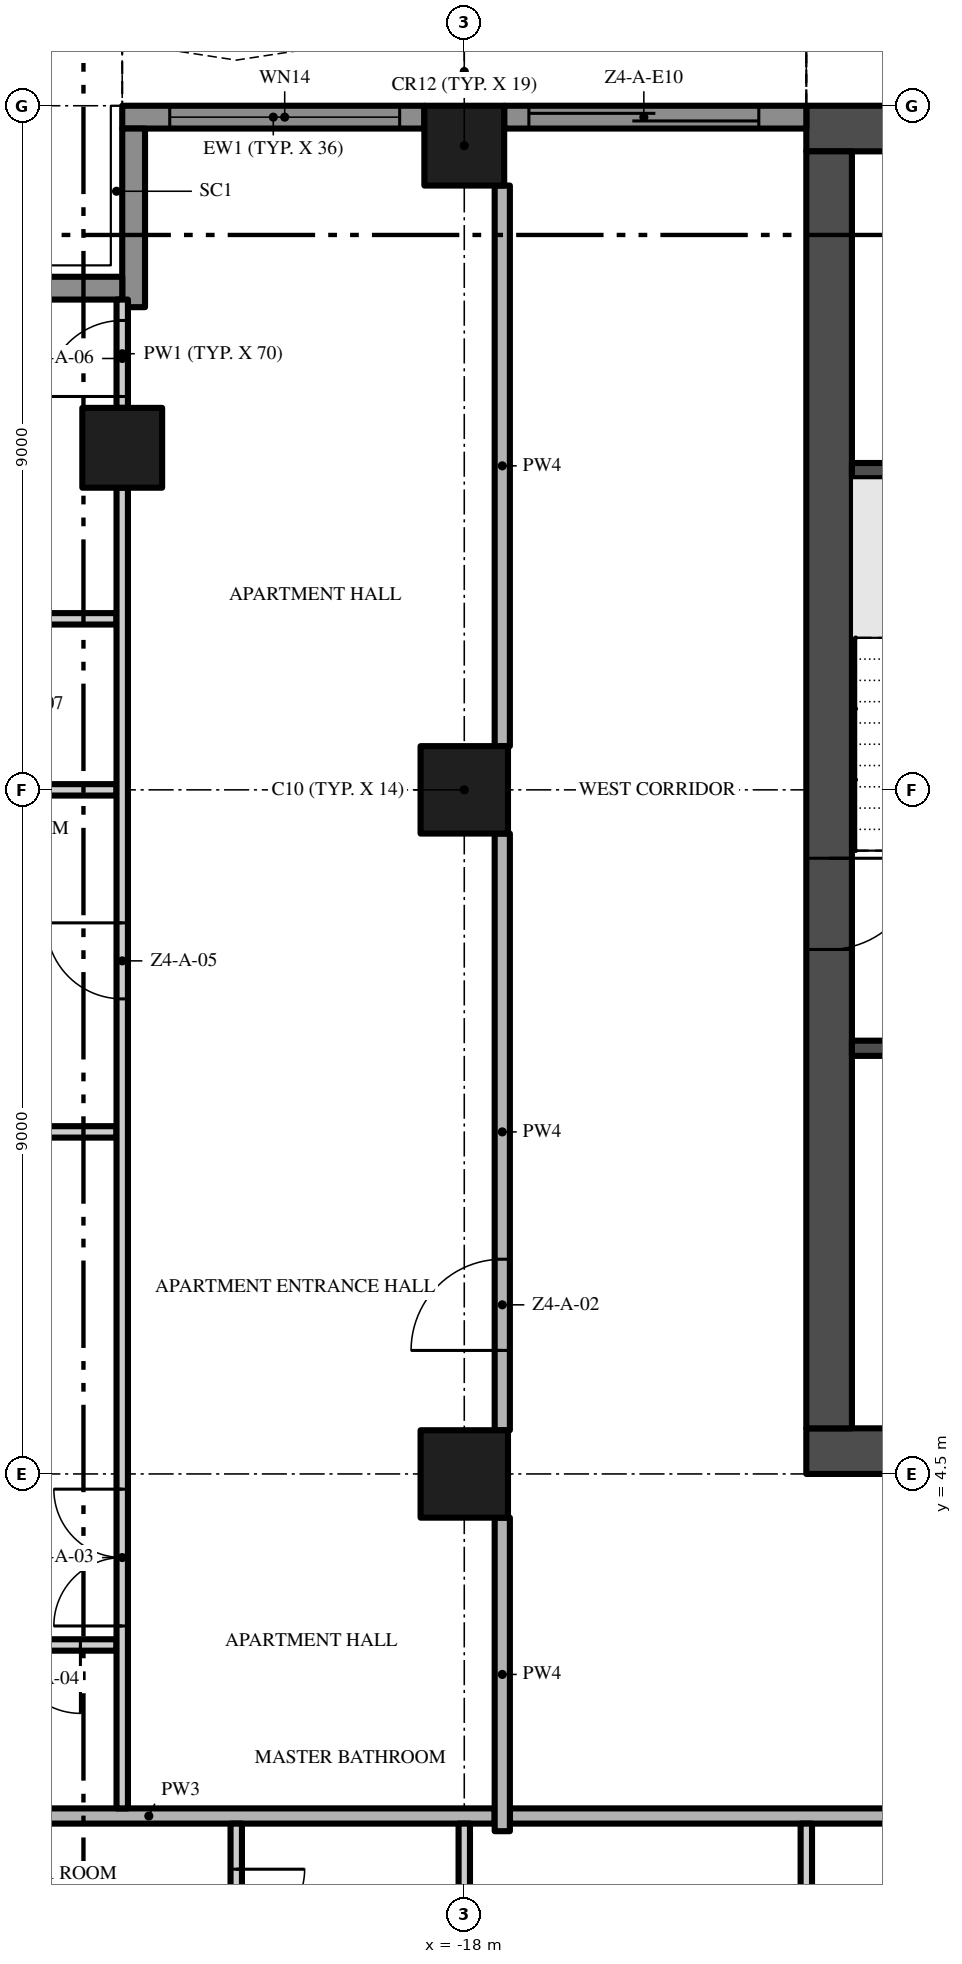
"""IFC4 building model, lengths in metres.
Left out: names, types, materials, properties, quantities, classifications, styles, units other than length and angle.
Written with IfcOpenShell. Run it as: python <this file> out.ifc"""

import sys

from ifc_helpers import new_model, si_unit, direction, frame, frame_2d, origin, origin_2d, place, context, subcontext, project, spatial, polyline, rectangle, outline, extrude, element, fill, save


model = new_model("IFC4")
c1 = context("Model", 3, precision=1e-05, world=origin(), true_north=direction((0.0, 1.0)))
c2 = subcontext(c1, "Body", "Model", "MODEL_VIEW")
j1 = project(units=[si_unit("LENGTHUNIT", "METRE"), si_unit("PLANEANGLEUNIT", "RADIAN")], contexts=[c1])
p1 = place(None, origin())
s1 = spatial("IfcSite", under=j1, at=p1, CompositionType="ELEMENT")
p2 = place(p1, origin())
s2 = spatial("IfcBuilding", under=s1, at=p2, CompositionType="ELEMENT")
p3 = place(p2, frame((0.0, 0.0, 188.2)))
s3 = spatial("IfcBuildingStorey", under=s2, at=p3, CompositionType="ELEMENT", Elevation=188.2)
p4 = place(p3, frame((-13.5, 4.8, -0.3), z_axis=(0.0, 0.0, 1.0), x_axis=(1.0, 0.0, 0.0)))
e1 = element("IfcWall", 1, at=p4, inside=s3, PredefinedType="SHEAR", context=c2, shape_type="SweptSolid", body=[
    extrude(rectangle(XDim=27.0, YDim=0.6, at=frame_2d((13.5, 0.0))), origin(), (0.0, 0.0, 1.0), 3.8),
])
p5 = place(p4, frame((12.0, 0.0, 0.3)))
e2 = element("IfcOpeningElement", 2, at=p5, cuts=e1, PredefinedType="OPENING", context=c2, shape_type="SweptSolid", body=[
    extrude(rectangle(XDim=3.0, YDim=2.4, at=frame_2d((1.5, 1.2))), frame((0.0, 0.31, 0.0), z_axis=(0.0, -1.0, 0.0), x_axis=(1.0, 0.0, 0.0)), (0.0, 0.0, 1.0), 0.62),
])
p6 = place(p4, frame((4.9, 0.0, 0.3)))
e3 = element("IfcOpeningElement", 3, at=p6, cuts=e1, PredefinedType="OPENING", context=c2, shape_type="SweptSolid", body=[
    extrude(rectangle(XDim=1.2, YDim=2.2, at=frame_2d((0.6, 1.1))), frame((0.0, 0.31, 0.0), z_axis=(0.0, -1.0, 0.0), x_axis=(1.0, 0.0, 0.0)), (0.0, 0.0, 1.0), 0.62),
])
p7 = place(p4, frame((20.75, 0.0, 0.3)))
e4 = element("IfcOpeningElement", 4, at=p7, cuts=e1, PredefinedType="OPENING", context=c2, shape_type="SweptSolid", body=[
    extrude(rectangle(XDim=1.5, YDim=2.2, at=frame_2d((0.75, 1.1))), frame((0.0, 0.31, 0.0), z_axis=(0.0, -1.0, 0.0), x_axis=(1.0, 0.0, 0.0)), (0.0, 0.0, 1.0), 0.62),
])
p8 = place(p4, frame((17.4, 0.0, 0.3)))
e5 = element("IfcOpeningElement", 5, at=p8, cuts=e1, PredefinedType="OPENING", context=c2, shape_type="SweptSolid", body=[
    extrude(rectangle(XDim=1.2, YDim=2.2, at=frame_2d((0.6, 1.1))), frame((0.0, 0.31, 0.0), z_axis=(0.0, -1.0, 0.0), x_axis=(1.0, 0.0, 0.0)), (0.0, 0.0, 1.0), 0.62),
])
p9 = place(p3, frame((13.5, 22.2, -0.3), z_axis=(0.0, 0.0, 1.0), x_axis=(-1.0, 0.0, 0.0)))
e6 = element("IfcWall", 6, at=p9, inside=s3, PredefinedType="SHEAR", context=c2, shape_type="SweptSolid", body=[
    extrude(rectangle(XDim=27.0, YDim=0.6, at=frame_2d((13.5, 0.0))), origin(), (0.0, 0.0, 1.0), 3.8),
])
p10 = place(p3, frame((-13.2, 21.9, -0.3), z_axis=(0.0, 0.0, 1.0), x_axis=(0.0, -1.0, 0.0)))
e7 = element("IfcWall", 7, at=p10, inside=s3, PredefinedType="SHEAR", context=c2, shape_type="SweptSolid", body=[
    extrude(rectangle(XDim=16.8, YDim=0.6, at=frame_2d((8.4, 0.0))), origin(), (0.0, 0.0, 1.0), 3.8),
])
p11 = place(p10, frame((9.3, 0.0, 0.3)))
e8 = element("IfcOpeningElement", 8, at=p11, cuts=e7, PredefinedType="OPENING", context=c2, shape_type="SweptSolid", body=[
    extrude(rectangle(XDim=1.2, YDim=2.2, at=frame_2d((0.6, 1.1))), frame((0.0, 0.31, 0.0), z_axis=(0.0, -1.0, 0.0), x_axis=(1.0, 0.0, 0.0)), (0.0, 0.0, 1.0), 0.62),
])
p12 = place(p3, frame((-18.0, 13.5, 0.0), z_axis=(0.0, 0.0, 1.0), x_axis=(1.0, 0.0, 0.0)))
e9 = element("IfcColumn", 9, at=p12, inside=s3, PredefinedType="COLUMN", context=c2, shape_type="SweptSolid", body=[
    extrude(rectangle(XDim=1.15, YDim=1.15, at=origin_2d()), origin(), (0.0, 0.0, 1.0), 3.5),
])
p13 = place(p3, frame((-18.0, 21.975, 0.0), z_axis=(0.0, 0.0, 1.0), x_axis=(1.0, 0.0, 0.0)))
e10 = element("IfcColumn", 10, at=p13, inside=s3, PredefinedType="COLUMN", context=c2, shape_type="SweptSolid", body=[
    extrude(rectangle(XDim=1.05, YDim=1.05, at=origin_2d()), origin(), (0.0, 0.0, 1.0), 3.5),
])
p14 = place(p3, frame((-18.0, 4.5, 0.0), z_axis=(0.0, 0.0, 1.0), x_axis=(1.0, 0.0, 0.0)))
e11 = element("IfcColumn", 11, at=p14, inside=s3, PredefinedType="COLUMN", context=c2, shape_type="SweptSolid", body=[
    extrude(rectangle(XDim=1.15, YDim=1.15, at=origin_2d()), origin(), (0.0, 0.0, 1.0), 3.5),
])
p15 = place(p3, frame((-22.5, 18.0, 0.0), z_axis=(0.0, 0.0, 1.0), x_axis=(1.0, 0.0, 0.0)))
e12 = element("IfcColumn", 12, at=p15, inside=s3, PredefinedType="COLUMN", context=c2, shape_type="SweptSolid", body=[
    extrude(rectangle(XDim=1.05, YDim=1.05, at=origin_2d()), origin(), (0.0, 0.0, 1.0), 3.5),
])
p16 = place(p3, frame((-17.475, 22.35, 0.0), z_axis=(0.0, 0.0, 1.0), x_axis=(1.0, 0.0, 0.0)))
e13 = element("IfcWall", 13, at=p16, inside=s3, PredefinedType="SOLIDWALL", context=c2, shape_type="SweptSolid", body=[
    extrude(rectangle(XDim=3.975, YDim=0.3, at=frame_2d((1.988, 0.0))), origin(), (0.0, 0.0, 1.0), 3.5),
])
p17 = place(p16, frame((0.325, 0.0, 0.0)))
e14 = element("IfcOpeningElement", 14, at=p17, cuts=e13, PredefinedType="OPENING", context=c2, shape_type="SweptSolid", body=[
    extrude(rectangle(XDim=3.025, YDim=2.4, at=frame_2d((1.512, 1.2))), frame((0.0, 0.16, 0.0), z_axis=(0.0, -1.0, 0.0), x_axis=(1.0, 0.0, 0.0)), (0.0, 0.0, 1.0), 0.32),
])
p18 = place(p3, frame((-22.5, 22.35, 0.0), z_axis=(0.0, 0.0, 1.0), x_axis=(1.0, 0.0, 0.0)))
e15 = element("IfcWall", 15, at=p18, inside=s3, PredefinedType="SOLIDWALL", context=c2, shape_type="SweptSolid", body=[
    extrude(rectangle(XDim=3.975, YDim=0.3, at=frame_2d((1.988, 0.0))), origin(), (0.0, 0.0, 1.0), 3.5),
])
p19 = place(p18, frame((0.625, 0.0, 0.45)))
e16 = element("IfcOpeningElement", 16, at=p19, cuts=e15, PredefinedType="OPENING", context=c2, shape_type="SweptSolid", body=[
    extrude(rectangle(XDim=3.025, YDim=2.65, at=frame_2d((1.512, 1.325))), frame((0.0, 0.16, 0.0), z_axis=(0.0, -1.0, 0.0), x_axis=(1.0, 0.0, 0.0)), (0.0, 0.0, 1.0), 0.32),
])
p20 = place(p3, frame((-22.35, 19.85, 0.0), z_axis=(0.0, 0.0, 1.0), x_axis=(0.0, 1.0, 0.0)))
e17 = element("IfcWall", 17, at=p20, inside=s3, PredefinedType="SOLIDWALL", context=c2, shape_type="SweptSolid", body=[
    extrude(rectangle(XDim=2.35, YDim=0.3, at=frame_2d((1.175, 0.0))), origin(), (0.0, 0.0, 1.0), 3.5),
])
p21 = place(p3, frame((-24.75, 20.1, 0.0), z_axis=(0.0, 0.0, 1.0), x_axis=(1.0, 0.0, 0.0)))
e18 = element("IfcWall", 18, at=p21, inside=s3, PredefinedType="SOLIDWALL", context=c2, shape_type="SweptSolid", body=[
    extrude(rectangle(XDim=2.25, YDim=0.3, at=frame_2d((1.125, 0.0))), origin(), (0.0, 0.0, 1.0), 3.5),
])
p22 = place(p3, origin())
e19 = element("IfcWall", 19, at=p22, inside=s3, PredefinedType="USERDEFINED", context=c2, shape_type="SweptSolid", body=[
    extrude(outline(polyline([(-13.5, 25.5), (-15.0, 25.271), (-16.5, 24.671), (-18.0, 23.929), (-19.5, 23.329), (-21.0, 23.1), (-22.5, 23.329), (-22.538, 23.082), (-21.0, 22.847), (-19.434, 23.086), (-17.898, 23.701), (-16.398, 24.442), (-14.934, 25.028), (-13.462, 25.253), (-13.5, 25.5)])), origin(), (0.0, 0.0, 1.0), 0.9),
])
for number, where, z_axis, x_axis in (
    (20, (-12.9, 10.1, 0.0), (0.0, 0.0, 1.0), (1.0, 0.0, 0.0)),
    (21, (-12.9, 17.7, 0.0), (0.0, 0.0, 1.0), (1.0, 0.0, 0.0)),
):
    element("IfcWall", number, at=place(p3, frame(where, z_axis=z_axis, x_axis=x_axis)), inside=s3, PredefinedType="SHEAR", context=c2, shape_type="SweptSolid", body=[
        extrude(rectangle(XDim=3.25, YDim=0.2, at=frame_2d((1.625, 0.0))), origin(), (0.0, 0.0, 1.0), 3.5),
    ])
p23 = place(p3, frame((-17.4, 0.0, 0.0), z_axis=(0.0, 0.0, 1.0), x_axis=(1.0, 0.0, 0.0)))
e22 = element("IfcWall", 22, at=p23, inside=s3, PredefinedType="PARTITIONING", context=c2, shape_type="SweptSolid", body=[
    extrude(rectangle(XDim=12.8, YDim=0.2, at=frame_2d((6.4, 0.0))), origin(), (0.0, 0.0, 1.0), 3.5),
])
p24 = place(p3, frame((-26.7, 0.0, 0.0), z_axis=(0.0, 0.0, 1.0), x_axis=(1.0, 0.0, 0.0)))
e23 = element("IfcWall", 23, at=p24, inside=s3, PredefinedType="PARTITIONING", context=c2, shape_type="SweptSolid", body=[
    extrude(rectangle(XDim=9.1, YDim=0.2, at=frame_2d((4.55, 0.0))), origin(), (0.0, 0.0, 1.0), 3.5),
])
p25 = place(p3, frame((-22.575, 2.25, 0.0), z_axis=(0.0, 0.0, 1.0), x_axis=(-1.0, 0.0, 0.0)))
e24 = element("IfcWall", 24, at=p25, inside=s3, PredefinedType="PARTITIONING", context=c2, shape_type="SweptSolid", body=[
    extrude(rectangle(XDim=1.875, YDim=0.15, at=frame_2d((0.938, 0.0))), origin(), (0.0, 0.0, 1.0), 3.5),
])
p26 = place(p25, frame((0.475, 0.0, 0.0)))
e25 = element("IfcOpeningElement", 25, at=p26, cuts=e24, PredefinedType="OPENING", context=c2, shape_type="SweptSolid", body=[
    extrude(rectangle(XDim=0.9, YDim=2.1, at=frame_2d((0.45, 1.05))), frame((0.0, 0.085, 0.0), z_axis=(0.0, -1.0, 0.0), x_axis=(1.0, 0.0, 0.0)), (0.0, 0.0, 1.0), 0.17),
])
p27 = place(p3, frame((-26.7, 9.0, 0.0), z_axis=(0.0, 0.0, 1.0), x_axis=(1.0, 0.0, 0.0)))
e26 = element("IfcWall", 26, at=p27, inside=s3, PredefinedType="PARTITIONING", context=c2, shape_type="SweptSolid", body=[
    extrude(rectangle(XDim=4.125, YDim=0.15, at=frame_2d((2.062, 0.0))), origin(), (0.0, 0.0, 1.0), 3.5),
])
p28 = place(p3, frame((-25.95, 13.5, 0.0), z_axis=(0.0, 0.0, 1.0), x_axis=(1.0, 0.0, 0.0)))
e27 = element("IfcWall", 27, at=p28, inside=s3, PredefinedType="PARTITIONING", context=c2, shape_type="SweptSolid", body=[
    extrude(rectangle(XDim=3.375, YDim=0.15, at=frame_2d((1.688, 0.0))), origin(), (0.0, 0.0, 1.0), 3.5),
])
p29 = place(p3, frame((-24.45, 15.75, 0.0), z_axis=(0.0, 0.0, 1.0), x_axis=(1.0, 0.0, 0.0)))
e28 = element("IfcWall", 28, at=p29, inside=s3, PredefinedType="PARTITIONING", context=c2, shape_type="SweptSolid", body=[
    extrude(rectangle(XDim=1.875, YDim=0.15, at=frame_2d((0.938, 0.0))), origin(), (0.0, 0.0, 1.0), 3.5),
])
p30 = place(p3, frame((-22.5, 0.1, 0.0), z_axis=(0.0, 0.0, 1.0), x_axis=(0.0, 1.0, 0.0)))
e29 = element("IfcWall", 29, at=p30, inside=s3, PredefinedType="PARTITIONING", context=c2, shape_type="SweptSolid", body=[
    extrude(rectangle(XDim=17.375, YDim=0.15, at=frame_2d((8.688, 0.0))), origin(), (0.0, 0.0, 1.0), 3.5),
])
p31 = place(p30, frame((2.4, 0.0, 0.0)))
e30 = element("IfcOpeningElement", 30, at=p31, cuts=e29, PredefinedType="OPENING", context=c2, shape_type="SweptSolid", body=[
    extrude(rectangle(XDim=1.8, YDim=2.4, at=frame_2d((0.9, 1.2))), frame((0.0, 0.085, 0.0), z_axis=(0.0, -1.0, 0.0), x_axis=(1.0, 0.0, 0.0)), (0.0, 0.0, 1.0), 0.17),
])
p32 = place(p30, frame((10.65, 0.0, 0.0)))
e31 = element("IfcOpeningElement", 31, at=p32, cuts=e29, PredefinedType="OPENING", context=c2, shape_type="SweptSolid", body=[
    extrude(rectangle(XDim=1.0, YDim=2.4, at=frame_2d((0.5, 1.2))), frame((0.0, 0.085, 0.0), z_axis=(0.0, -1.0, 0.0), x_axis=(1.0, 0.0, 0.0)), (0.0, 0.0, 1.0), 0.17),
])
p33 = place(p3, frame((-22.5, 18.525, 0.0), z_axis=(0.0, 0.0, 1.0), x_axis=(0.0, 1.0, 0.0)))
e32 = element("IfcWall", 32, at=p33, inside=s3, PredefinedType="PARTITIONING", context=c2, shape_type="SweptSolid", body=[
    extrude(rectangle(XDim=1.425, YDim=0.15, at=frame_2d((0.713, 0.0))), origin(), (0.0, 0.0, 1.0), 3.5),
])
p34 = place(p33, frame((0.15, 0.0, 0.0)))
e33 = element("IfcOpeningElement", 33, at=p34, cuts=e32, PredefinedType="OPENING", context=c2, shape_type="SweptSolid", body=[
    extrude(rectangle(XDim=1.0, YDim=2.4, at=frame_2d((0.5, 1.2))), frame((0.0, 0.085, 0.0), z_axis=(0.0, -1.0, 0.0), x_axis=(1.0, 0.0, 0.0)), (0.0, 0.0, 1.0), 0.17),
])
p35 = place(p3, frame((-21.0, -0.1, 0.0), z_axis=(0.0, 0.0, 1.0), x_axis=(0.0, -1.0, 0.0)))
e34 = element("IfcWall", 34, at=p35, inside=s3, PredefinedType="PARTITIONING", context=c2, shape_type="SweptSolid", body=[
    extrude(rectangle(XDim=2.225, YDim=0.15, at=frame_2d((1.113, 0.0))), origin(), (0.0, 0.0, 1.0), 3.5),
])
p36 = place(p35, frame((0.6, 0.0, 0.0)))
e35 = element("IfcOpeningElement", 35, at=p36, cuts=e34, PredefinedType="OPENING", context=c2, shape_type="SweptSolid", body=[
    extrude(rectangle(XDim=0.9, YDim=2.1, at=frame_2d((0.45, 1.05))), frame((0.0, 0.085, 0.0), z_axis=(0.0, -1.0, 0.0), x_axis=(1.0, 0.0, 0.0)), (0.0, 0.0, 1.0), 0.17),
])
p37 = place(p3, frame((-18.0, -3.925, 0.0), z_axis=(0.0, 0.0, 1.0), x_axis=(0.0, 1.0, 0.0)))
e36 = element("IfcWall", 36, at=p37, inside=s3, PredefinedType="PARTITIONING", context=c2, shape_type="SweptSolid", body=[
    extrude(rectangle(XDim=3.825, YDim=0.15, at=frame_2d((1.913, 0.0))), origin(), (0.0, 0.0, 1.0), 3.5),
])
p38 = place(p37, frame((0.15, 0.0, 0.0)))
e37 = element("IfcOpeningElement", 37, at=p38, cuts=e36, PredefinedType="OPENING", context=c2, shape_type="SweptSolid", body=[
    extrude(rectangle(XDim=1.0, YDim=2.4, at=frame_2d((0.5, 1.2))), frame((0.0, 0.085, 0.0), z_axis=(0.0, -1.0, 0.0), x_axis=(1.0, 0.0, 0.0)), (0.0, 0.0, 1.0), 0.17),
])
p39 = place(p3, frame((-17.5, -0.2, 0.0), z_axis=(0.0, 0.0, 1.0), x_axis=(0.0, 1.0, 0.0)))
e38 = element("IfcWall", 38, at=p39, inside=s3, PredefinedType="PARTITIONING", context=c2, shape_type="SweptSolid", body=[
    extrude(rectangle(XDim=4.125, YDim=0.2, at=frame_2d((2.062, 0.0))), origin(), (0.0, 0.0, 1.0), 3.5),
])
p40 = place(p3, frame((-17.5, 5.075, 0.0), z_axis=(0.0, 0.0, 1.0), x_axis=(0.0, 1.0, 0.0)))
e39 = element("IfcWall", 39, at=p40, inside=s3, PredefinedType="PARTITIONING", context=c2, shape_type="SweptSolid", body=[
    extrude(rectangle(XDim=7.85, YDim=0.2, at=frame_2d((3.925, 0.0))), origin(), (0.0, 0.0, 1.0), 3.5),
])
p41 = place(p40, frame((1.05, 0.0, 0.0)))
e40 = element("IfcOpeningElement", 40, at=p41, cuts=e39, PredefinedType="OPENING", context=c2, shape_type="SweptSolid", body=[
    extrude(rectangle(XDim=1.2, YDim=2.4, at=frame_2d((0.6, 1.2))), frame((0.0, 0.11, 0.0), z_axis=(0.0, -1.0, 0.0), x_axis=(1.0, 0.0, 0.0)), (0.0, 0.0, 1.0), 0.22),
])
p42 = place(p3, frame((-17.5, 14.075, 0.0), z_axis=(0.0, 0.0, 1.0), x_axis=(0.0, 1.0, 0.0)))
e41 = element("IfcWall", 41, at=p42, inside=s3, PredefinedType="PARTITIONING", context=c2, shape_type="SweptSolid", body=[
    extrude(rectangle(XDim=7.375, YDim=0.2, at=frame_2d((3.688, 0.0))), origin(), (0.0, 0.0, 1.0), 3.5),
])
p43 = place(p3, frame((-13.5, -11.325, 0.0), z_axis=(0.0, 0.0, 1.0), x_axis=(0.0, 1.0, 0.0)))
e42 = element("IfcWall", 42, at=p43, inside=s3, PredefinedType="PARTITIONING", context=c2, shape_type="SweptSolid", body=[
    extrude(rectangle(XDim=11.225, YDim=0.15, at=frame_2d((5.612, 0.0))), origin(), (0.0, 0.0, 1.0), 3.5),
])
p44 = place(p17, origin())
e43 = element("IfcDoor", 43, at=p44, inside=s3, OperationType="SINGLE_SWING_LEFT", PredefinedType="DOOR", context=c2, shape_type="SweptSolid", body=[
    extrude(rectangle(XDim=3.025, YDim=2.4, at=frame_2d((1.512, 1.2))), frame((0.0, 0.025, 0.0), z_axis=(0.0, -1.0, 0.0), x_axis=(1.0, 0.0, 0.0)), (0.0, 0.0, 1.0), 0.05),
])
fill(e14, e43)
p45 = place(p19, origin())
e44 = element("IfcWindow", 44, at=p45, inside=s3, PartitioningType="SINGLE_PANEL", PredefinedType="WINDOW", context=c2, shape_type="SweptSolid", body=[
    extrude(rectangle(XDim=3.025, YDim=2.65, at=frame_2d((1.512, 1.325))), frame((0.0, 0.03, 0.0), z_axis=(0.0, -1.0, 0.0), x_axis=(1.0, 0.0, 0.0)), (0.0, 0.0, 1.0), 0.06),
])
fill(e16, e44)
p46 = place(p11, frame((1.2, 0.0, 0.0), z_axis=(0.0, 0.0, 1.0), x_axis=(-1.0, 0.0, 0.0)))
e45 = element("IfcDoor", 45, at=p46, inside=s3, OperationType="SINGLE_SWING_RIGHT", PredefinedType="DOOR", context=c2, shape_type="SweptSolid", body=[
    extrude(rectangle(XDim=1.2, YDim=2.2, at=frame_2d((0.6, 1.1))), frame((0.0, 0.025, 0.0), z_axis=(0.0, -1.0, 0.0), x_axis=(1.0, 0.0, 0.0)), (0.0, 0.0, 1.0), 0.05),
])
fill(e8, e45)
p47 = place(p41, origin())
e46 = element("IfcDoor", 46, at=p47, inside=s3, OperationType="SINGLE_SWING_LEFT", PredefinedType="DOOR", context=c2, shape_type="SweptSolid", body=[
    extrude(rectangle(XDim=1.2, YDim=2.4, at=frame_2d((0.6, 1.2))), frame((0.0, 0.025, 0.0), z_axis=(0.0, -1.0, 0.0), x_axis=(1.0, 0.0, 0.0)), (0.0, 0.0, 1.0), 0.05),
])
fill(e40, e46)
p48 = place(p31, origin())
e47 = element("IfcDoor", 47, at=p48, inside=s3, OperationType="DOUBLE_DOOR_SINGLE_SWING", PredefinedType="DOOR", context=c2, shape_type="SweptSolid", body=[
    extrude(rectangle(XDim=1.8, YDim=2.4, at=frame_2d((0.9, 1.2))), frame((0.0, 0.025, 0.0), z_axis=(0.0, -1.0, 0.0), x_axis=(1.0, 0.0, 0.0)), (0.0, 0.0, 1.0), 0.05),
])
fill(e30, e47)
p49 = place(p26, origin())
e48 = element("IfcDoor", 48, at=p49, inside=s3, OperationType="SINGLE_SWING_LEFT", PredefinedType="DOOR", context=c2, shape_type="SweptSolid", body=[
    extrude(rectangle(XDim=0.9, YDim=2.1, at=frame_2d((0.45, 1.05))), frame((0.0, 0.025, 0.0), z_axis=(0.0, -1.0, 0.0), x_axis=(1.0, 0.0, 0.0)), (0.0, 0.0, 1.0), 0.05),
])
fill(e25, e48)
p50 = place(p32, origin())
e49 = element("IfcDoor", 49, at=p50, inside=s3, OperationType="SINGLE_SWING_RIGHT", PredefinedType="DOOR", context=c2, shape_type="SweptSolid", body=[
    extrude(rectangle(XDim=1.0, YDim=2.4, at=frame_2d((0.5, 1.2))), frame((0.0, 0.025, 0.0), z_axis=(0.0, -1.0, 0.0), x_axis=(1.0, 0.0, 0.0)), (0.0, 0.0, 1.0), 0.05),
])
fill(e31, e49)
p51 = place(p34, origin())
e50 = element("IfcDoor", 50, at=p51, inside=s3, OperationType="SINGLE_SWING_LEFT", PredefinedType="DOOR", context=c2, shape_type="SweptSolid", body=[
    extrude(rectangle(XDim=1.0, YDim=2.4, at=frame_2d((0.5, 1.2))), frame((0.0, 0.025, 0.0), z_axis=(0.0, -1.0, 0.0), x_axis=(1.0, 0.0, 0.0)), (0.0, 0.0, 1.0), 0.05),
])
fill(e33, e50)
p52 = place(p36, origin())
e51 = element("IfcDoor", 51, at=p52, inside=s3, OperationType="SINGLE_SWING_LEFT", PredefinedType="DOOR", context=c2, shape_type="SweptSolid", body=[
    extrude(rectangle(XDim=0.9, YDim=2.1, at=frame_2d((0.45, 1.05))), frame((0.0, 0.025, 0.0), z_axis=(0.0, -1.0, 0.0), x_axis=(1.0, 0.0, 0.0)), (0.0, 0.0, 1.0), 0.05),
])
fill(e35, e51)
save(model, sys.argv[1])
